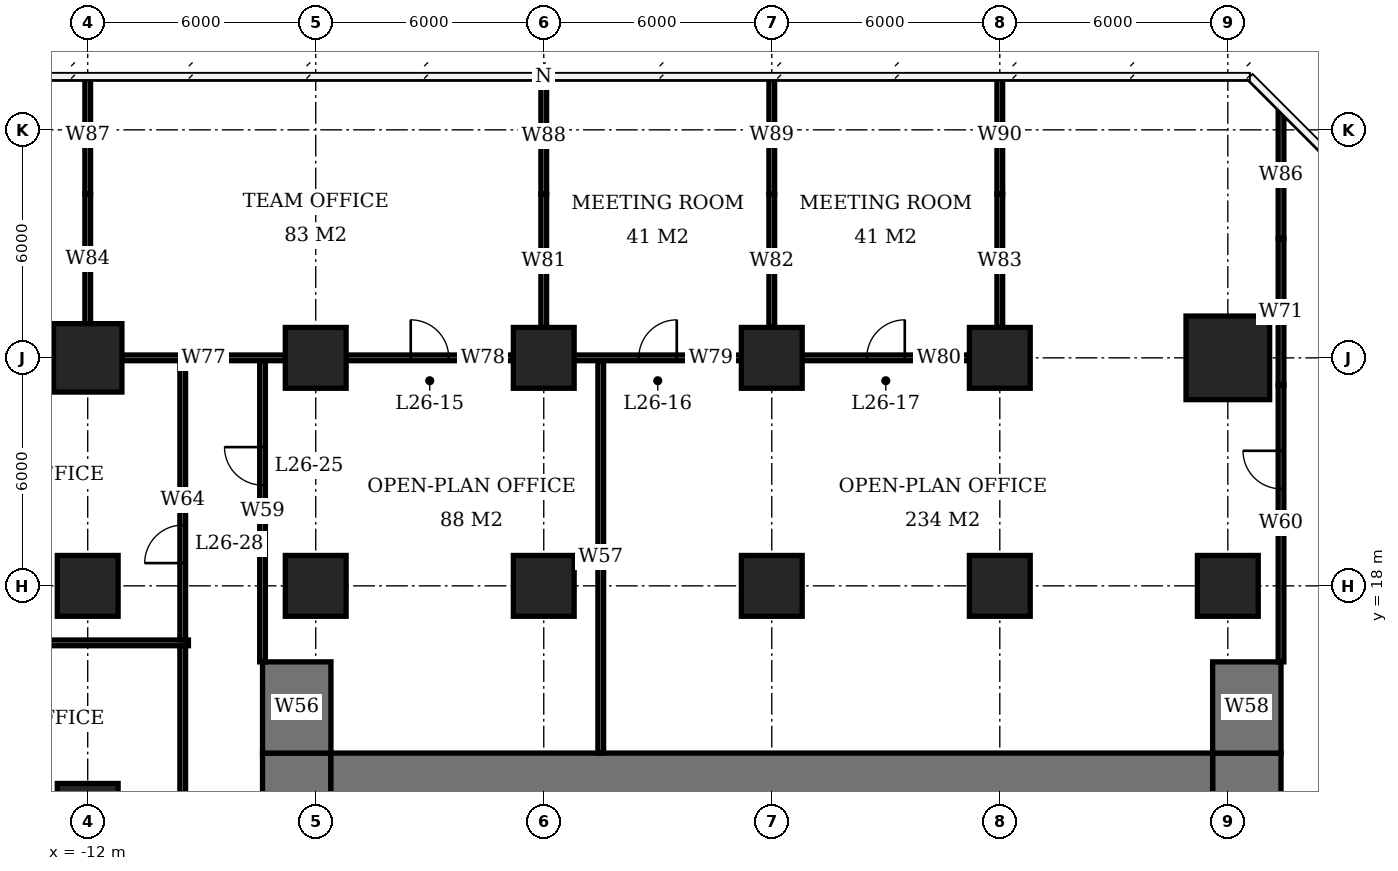
"""IFC4 building model, lengths in metres.
Left out: names, types, materials, properties, quantities, classifications, styles, units other than length and angle.
Written with IfcOpenShell. Run it as: python <this file> out.ifc"""

import sys

from ifc_helpers import new_model, si_unit, direction, frame, frame_2d, origin, origin_2d, place, context, subcontext, project, spatial, rectangle, extrude, element, fill, save


model = new_model("IFC4")
c1 = context("Model", 3, precision=1e-05, world=origin(), true_north=direction((0.0, 1.0)))
c2 = subcontext(c1, "Body", "Model", "MODEL_VIEW")
j1 = project(units=[si_unit("LENGTHUNIT", "METRE"), si_unit("PLANEANGLEUNIT", "RADIAN")], contexts=[c1])
p1 = place(None, origin())
s1 = spatial("IfcSite", under=j1, at=p1, CompositionType="ELEMENT")
p2 = place(p1, origin())
s2 = spatial("IfcBuilding", under=s1, at=p2, CompositionType="ELEMENT")
p3 = place(p2, frame((0.0, 0.0, 109.4)))
s3 = spatial("IfcBuildingStorey", under=s2, at=p3, CompositionType="ELEMENT", Elevation=109.4)
for number, where, z_axis, x_axis in (
    (1, (-12.0, 12.0, 0.0), (0.0, 0.0, 1.0), (1.0, 0.0, 0.0)),
    (2, (-12.0, 18.0, 0.0), (0.0, 0.0, 1.0), (1.0, 0.0, 0.0)),
):
    element("IfcColumn", number, at=place(p3, frame(where, z_axis=z_axis, x_axis=x_axis)), inside=s3, PredefinedType="COLUMN", context=c2, shape_type="SweptSolid", body=[
        extrude(rectangle(XDim=1.6, YDim=1.6, at=origin_2d()), origin(), (0.0, 0.0, 1.0), 3.9),
    ])
p4 = place(p3, frame((-12.0, 24.0, 0.0), z_axis=(0.0, 0.0, 1.0), x_axis=(1.0, 0.0, 0.0)))
e3 = element("IfcColumn", 3, at=p4, inside=s3, PredefinedType="COLUMN", context=c2, shape_type="SweptSolid", body=[
    extrude(rectangle(XDim=1.8, YDim=1.8, at=origin_2d()), origin(), (0.0, 0.0, 1.0), 3.9),
])
for number, where, z_axis, x_axis in (
    (4, (-6.0, 18.0, 0.0), (0.0, 0.0, 1.0), (1.0, 0.0, 0.0)),
    (5, (-6.0, 24.0, 0.0), (0.0, 0.0, 1.0), (1.0, 0.0, 0.0)),
    (6, (0.0, 18.0, 0.0), (0.0, 0.0, 1.0), (1.0, 0.0, 0.0)),
    (7, (0.0, 24.0, 0.0), (0.0, 0.0, 1.0), (1.0, 0.0, 0.0)),
    (8, (6.0, 18.0, 0.0), (0.0, 0.0, 1.0), (1.0, 0.0, 0.0)),
    (9, (6.0, 24.0, 0.0), (0.0, 0.0, 1.0), (1.0, 0.0, 0.0)),
    (10, (12.0, 18.0, 0.0), (0.0, 0.0, 1.0), (1.0, 0.0, 0.0)),
    (11, (12.0, 24.0, 0.0), (0.0, 0.0, 1.0), (1.0, 0.0, 0.0)),
    (12, (18.0, 18.0, 0.0), (0.0, 0.0, 1.0), (1.0, 0.0, 0.0)),
):
    element("IfcColumn", number, at=place(p3, frame(where, z_axis=z_axis, x_axis=x_axis)), inside=s3, PredefinedType="COLUMN", context=c2, shape_type="SweptSolid", body=[
        extrude(rectangle(XDim=1.6, YDim=1.6, at=origin_2d()), origin(), (0.0, 0.0, 1.0), 3.9),
    ])
p5 = place(p3, frame((18.0, 24.0, 0.0), z_axis=(0.0, 0.0, 1.0), x_axis=(1.0, 0.0, 0.0)))
e13 = element("IfcColumn", 13, at=p5, inside=s3, PredefinedType="COLUMN", context=c2, shape_type="SweptSolid", body=[
    extrude(rectangle(XDim=2.2, YDim=2.2, at=origin_2d()), origin(), (0.0, 0.0, 1.0), 3.9),
])
p6 = place(p3, frame((-5.6, 12.6, 0.0), z_axis=(0.0, 0.0, 1.0), x_axis=(1.0, 0.0, 0.0)))
e14 = element("IfcWall", 14, at=p6, inside=s3, PredefinedType="SHEAR", context=c2, shape_type="SweptSolid", body=[
    extrude(rectangle(XDim=23.2, YDim=2.0, at=frame_2d((11.6, 0.0))), origin(), (0.0, 0.0, 1.0), 3.9),
])
p7 = place(p3, frame((-6.5, -7.6, 0.0), z_axis=(0.0, 0.0, 1.0), x_axis=(0.0, 1.0, 0.0)))
e15 = element("IfcWall", 15, at=p7, inside=s3, PredefinedType="SHEAR", context=c2, shape_type="SweptSolid", body=[
    extrude(rectangle(XDim=21.2, YDim=1.8, at=frame_2d((10.6, 0.0))), origin(), (0.0, 0.0, 1.0), 3.9),
])
p8 = place(p7, frame((7.8, 0.0, 0.0)))
e16 = element("IfcOpeningElement", 16, at=p8, cuts=e15, PredefinedType="OPENING", context=c2, shape_type="SweptSolid", body=[
    extrude(rectangle(XDim=1.8, YDim=2.4, at=frame_2d((0.9, 1.2))), frame((0.0, 0.91, 0.0), z_axis=(0.0, -1.0, 0.0), x_axis=(1.0, 0.0, 0.0)), (0.0, 0.0, 1.0), 1.82),
])
p9 = place(p3, frame((18.5, -7.6, 0.0), z_axis=(0.0, 0.0, 1.0), x_axis=(0.0, 1.0, 0.0)))
e17 = element("IfcWall", 17, at=p9, inside=s3, PredefinedType="SHEAR", context=c2, shape_type="SweptSolid", body=[
    extrude(rectangle(XDim=21.2, YDim=1.8, at=frame_2d((10.6, 0.0))), origin(), (0.0, 0.0, 1.0), 3.9),
])
p10 = place(p9, frame((9.2, 0.0, 0.0)))
e18 = element("IfcOpeningElement", 18, at=p10, cuts=e17, PredefinedType="OPENING", context=c2, shape_type="SweptSolid", body=[
    extrude(rectangle(XDim=1.8, YDim=2.4, at=frame_2d((0.9, 1.2))), frame((0.0, 0.91, 0.0), z_axis=(0.0, -1.0, 0.0), x_axis=(1.0, 0.0, 0.0)), (0.0, 0.0, 1.0), 1.82),
])
for number, where, z_axis, x_axis in (
    (19, (-6.5, 13.6, 0.0), (0.0, 0.0, 1.0), (0.0, 1.0, 0.0)),
    (20, (18.5, 13.6, 0.0), (0.0, 0.0, 1.0), (0.0, 1.0, 0.0)),
):
    element("IfcWall", number, at=place(p3, frame(where, z_axis=z_axis, x_axis=x_axis)), inside=s3, PredefinedType="SHEAR", context=c2, shape_type="SweptSolid", body=[
        extrude(rectangle(XDim=2.4, YDim=1.8, at=frame_2d((1.2, 0.0))), origin(), (0.0, 0.0, 1.0), 3.9),
    ])
p11 = place(p3, frame((-11.1, 24.0, 0.0), z_axis=(0.0, 0.0, 1.0), x_axis=(1.0, 0.0, 0.0)))
e21 = element("IfcWall", 21, at=p11, inside=s3, PredefinedType="PARTITIONING", context=c2, shape_type="SweptSolid", body=[
    extrude(rectangle(XDim=4.3, YDim=0.15, at=frame_2d((2.15, 0.0))), origin(), (0.0, 0.0, 1.0), 3.65),
])
p12 = place(p3, frame((-5.2, 24.0, 0.0), z_axis=(0.0, 0.0, 1.0), x_axis=(1.0, 0.0, 0.0)))
e22 = element("IfcWall", 22, at=p12, inside=s3, PredefinedType="PARTITIONING", context=c2, shape_type="SweptSolid", body=[
    extrude(rectangle(XDim=4.4, YDim=0.15, at=frame_2d((2.2, 0.0))), origin(), (0.0, 0.0, 1.0), 3.65),
])
p13 = place(p12, frame((1.7, 0.0, 0.0)))
e23 = element("IfcOpeningElement", 23, at=p13, cuts=e22, PredefinedType="OPENING", context=c2, shape_type="SweptSolid", body=[
    extrude(rectangle(XDim=1.0, YDim=2.1, at=frame_2d((0.5, 1.05))), frame((0.0, 0.085, 0.0), z_axis=(0.0, -1.0, 0.0), x_axis=(1.0, 0.0, 0.0)), (0.0, 0.0, 1.0), 0.17),
])
p14 = place(p3, frame((0.8, 24.0, 0.0), z_axis=(0.0, 0.0, 1.0), x_axis=(1.0, 0.0, 0.0)))
e24 = element("IfcWall", 24, at=p14, inside=s3, PredefinedType="PARTITIONING", context=c2, shape_type="SweptSolid", body=[
    extrude(rectangle(XDim=4.4, YDim=0.15, at=frame_2d((2.2, 0.0))), origin(), (0.0, 0.0, 1.0), 3.65),
])
p15 = place(p14, frame((1.7, 0.0, 0.0)))
e25 = element("IfcOpeningElement", 25, at=p15, cuts=e24, PredefinedType="OPENING", context=c2, shape_type="SweptSolid", body=[
    extrude(rectangle(XDim=1.0, YDim=2.1, at=frame_2d((0.5, 1.05))), frame((0.0, 0.085, 0.0), z_axis=(0.0, -1.0, 0.0), x_axis=(1.0, 0.0, 0.0)), (0.0, 0.0, 1.0), 0.17),
])
p16 = place(p3, frame((6.8, 24.0, 0.0), z_axis=(0.0, 0.0, 1.0), x_axis=(1.0, 0.0, 0.0)))
e26 = element("IfcWall", 26, at=p16, inside=s3, PredefinedType="PARTITIONING", context=c2, shape_type="SweptSolid", body=[
    extrude(rectangle(XDim=4.4, YDim=0.15, at=frame_2d((2.2, 0.0))), origin(), (0.0, 0.0, 1.0), 3.65),
])
p17 = place(p16, frame((1.7, 0.0, 0.0)))
e27 = element("IfcOpeningElement", 27, at=p17, cuts=e26, PredefinedType="OPENING", context=c2, shape_type="SweptSolid", body=[
    extrude(rectangle(XDim=1.0, YDim=2.1, at=frame_2d((0.5, 1.05))), frame((0.0, 0.085, 0.0), z_axis=(0.0, -1.0, 0.0), x_axis=(1.0, 0.0, 0.0)), (0.0, 0.0, 1.0), 0.17),
])
p18 = place(p3, frame((-12.0, 24.9, 0.0), z_axis=(0.0, 0.0, 1.0), x_axis=(0.0, 1.0, 0.0)))
e28 = element("IfcWall", 28, at=p18, inside=s3, PredefinedType="PARTITIONING", context=c2, shape_type="SweptSolid", body=[
    extrude(rectangle(XDim=3.41, YDim=0.15, at=frame_2d((1.705, 0.0))), origin(), (0.0, 0.0, 1.0), 2.65),
])
p19 = place(p3, frame((-12.0, 28.31, 0.0), z_axis=(0.0, 0.0, 1.0), x_axis=(0.0, 1.0, 0.0)))
e29 = element("IfcWall", 29, at=p19, inside=s3, PredefinedType="PARTITIONING", context=c2, shape_type="SweptSolid", body=[
    extrude(rectangle(XDim=3.09, YDim=0.15, at=frame_2d((1.545, 0.0))), origin(), (0.0, 0.0, 1.0), 3.65),
])
p20 = place(p3, frame((0.0, 24.8, 0.0), z_axis=(0.0, 0.0, 1.0), x_axis=(0.0, 1.0, 0.0)))
e30 = element("IfcWall", 30, at=p20, inside=s3, PredefinedType="PARTITIONING", context=c2, shape_type="SweptSolid", body=[
    extrude(rectangle(XDim=3.51, YDim=0.15, at=frame_2d((1.755, 0.0))), origin(), (0.0, 0.0, 1.0), 2.65),
])
p21 = place(p3, frame((0.0, 28.31, 0.0), z_axis=(0.0, 0.0, 1.0), x_axis=(0.0, 1.0, 0.0)))
e31 = element("IfcWall", 31, at=p21, inside=s3, PredefinedType="PARTITIONING", context=c2, shape_type="SweptSolid", body=[
    extrude(rectangle(XDim=3.04, YDim=0.15, at=frame_2d((1.52, 0.0))), origin(), (0.0, 0.0, 1.0), 3.65),
])
p22 = place(p3, frame((6.0, 24.8, 0.0), z_axis=(0.0, 0.0, 1.0), x_axis=(0.0, 1.0, 0.0)))
e32 = element("IfcWall", 32, at=p22, inside=s3, PredefinedType="PARTITIONING", context=c2, shape_type="SweptSolid", body=[
    extrude(rectangle(XDim=3.51, YDim=0.15, at=frame_2d((1.755, 0.0))), origin(), (0.0, 0.0, 1.0), 2.65),
])
p23 = place(p3, frame((6.0, 28.31, 0.0), z_axis=(0.0, 0.0, 1.0), x_axis=(0.0, 1.0, 0.0)))
e33 = element("IfcWall", 33, at=p23, inside=s3, PredefinedType="PARTITIONING", context=c2, shape_type="SweptSolid", body=[
    extrude(rectangle(XDim=3.09, YDim=0.15, at=frame_2d((1.545, 0.0))), origin(), (0.0, 0.0, 1.0), 3.65),
])
p24 = place(p3, frame((12.0, 24.8, 0.0), z_axis=(0.0, 0.0, 1.0), x_axis=(0.0, 1.0, 0.0)))
e34 = element("IfcWall", 34, at=p24, inside=s3, PredefinedType="PARTITIONING", context=c2, shape_type="SweptSolid", body=[
    extrude(rectangle(XDim=3.51, YDim=0.15, at=frame_2d((1.755, 0.0))), origin(), (0.0, 0.0, 1.0), 2.65),
])
p25 = place(p3, frame((12.0, 28.31, 0.0), z_axis=(0.0, 0.0, 1.0), x_axis=(0.0, 1.0, 0.0)))
e35 = element("IfcWall", 35, at=p25, inside=s3, PredefinedType="PARTITIONING", context=c2, shape_type="SweptSolid", body=[
    extrude(rectangle(XDim=3.09, YDim=0.15, at=frame_2d((1.545, 0.0))), origin(), (0.0, 0.0, 1.0), 3.65),
])
p26 = place(p3, frame((-21.59, 16.5, 0.0), z_axis=(0.0, 0.0, 1.0), x_axis=(1.0, 0.0, 0.0)))
e36 = element("IfcWall", 36, at=p26, inside=s3, PredefinedType="PARTITIONING", context=c2, shape_type="SweptSolid", body=[
    extrude(rectangle(XDim=12.24, YDim=0.15, at=frame_2d((6.12, 0.0))), origin(), (0.0, 0.0, 1.0), 3.65),
])
p27 = place(p3, frame((-9.5, 4.575, 0.0), z_axis=(0.0, 0.0, 1.0), x_axis=(0.0, 1.0, 0.0)))
e37 = element("IfcWall", 37, at=p27, inside=s3, PredefinedType="PARTITIONING", context=c2, shape_type="SweptSolid", body=[
    extrude(rectangle(XDim=11.85, YDim=0.15, at=frame_2d((5.925, 0.0))), origin(), (0.0, 0.0, 1.0), 3.65),
])
p28 = place(p27, frame((3.625, 0.0, 0.0)))
e38 = element("IfcOpeningElement", 38, at=p28, cuts=e37, PredefinedType="OPENING", context=c2, shape_type="SweptSolid", body=[
    extrude(rectangle(XDim=1.0, YDim=2.1, at=frame_2d((0.5, 1.05))), frame((0.0, 0.085, 0.0), z_axis=(0.0, -1.0, 0.0), x_axis=(1.0, 0.0, 0.0)), (0.0, 0.0, 1.0), 0.17),
])
p29 = place(p3, frame((-9.5, 16.575, 0.0), z_axis=(0.0, 0.0, 1.0), x_axis=(0.0, 1.0, 0.0)))
e39 = element("IfcWall", 39, at=p29, inside=s3, PredefinedType="PARTITIONING", context=c2, shape_type="SweptSolid", body=[
    extrude(rectangle(XDim=7.35, YDim=0.15, at=frame_2d((3.675, 0.0))), origin(), (0.0, 0.0, 1.0), 3.65),
])
p30 = place(p29, frame((2.024, 0.0, 0.0)))
e40 = element("IfcOpeningElement", 40, at=p30, cuts=e39, PredefinedType="OPENING", context=c2, shape_type="SweptSolid", body=[
    extrude(rectangle(XDim=1.0, YDim=2.1, at=frame_2d((0.5, 1.05))), frame((0.0, 0.085, 0.0), z_axis=(0.0, -1.0, 0.0), x_axis=(1.0, 0.0, 0.0)), (0.0, 0.0, 1.0), 0.17),
])
p31 = place(p3, frame((-7.4, 16.0, 0.0), z_axis=(0.0, 0.0, 1.0), x_axis=(0.0, 1.0, 0.0)))
e41 = element("IfcWall", 41, at=p31, inside=s3, PredefinedType="PARTITIONING", context=c2, shape_type="SweptSolid", body=[
    extrude(rectangle(XDim=7.925, YDim=0.15, at=frame_2d((3.962, 0.0))), origin(), (0.0, 0.0, 1.0), 3.65),
])
p32 = place(p31, frame((4.651, 0.0, 0.0)))
e42 = element("IfcOpeningElement", 42, at=p32, cuts=e41, PredefinedType="OPENING", context=c2, shape_type="SweptSolid", body=[
    extrude(rectangle(XDim=1.0, YDim=2.1, at=frame_2d((0.5, 1.05))), frame((0.0, 0.085, 0.0), z_axis=(0.0, -1.0, 0.0), x_axis=(1.0, 0.0, 0.0)), (0.0, 0.0, 1.0), 0.17),
])
p33 = place(p3, frame((1.5, 13.6, 0.0), z_axis=(0.0, 0.0, 1.0), x_axis=(0.0, 1.0, 0.0)))
e43 = element("IfcWall", 43, at=p33, inside=s3, PredefinedType="PARTITIONING", context=c2, shape_type="SweptSolid", body=[
    extrude(rectangle(XDim=10.325, YDim=0.15, at=frame_2d((5.163, 0.0))), origin(), (0.0, 0.0, 1.0), 3.65),
])
p34 = place(p3, frame((19.4, 16.0, 0.0), z_axis=(0.0, 0.0, 1.0), x_axis=(0.0, 1.0, 0.0)))
e44 = element("IfcWall", 44, at=p34, inside=s3, PredefinedType="PARTITIONING", context=c2, shape_type="SweptSolid", body=[
    extrude(rectangle(XDim=7.29, YDim=0.15, at=frame_2d((3.645, 0.0))), origin(), (0.0, 0.0, 1.0), 3.65),
])
p35 = place(p34, frame((4.554, 0.0, 0.0)))
e45 = element("IfcOpeningElement", 45, at=p35, cuts=e44, PredefinedType="OPENING", context=c2, shape_type="SweptSolid", body=[
    extrude(rectangle(XDim=1.0, YDim=2.1, at=frame_2d((0.5, 1.05))), frame((0.0, 0.085, 0.0), z_axis=(0.0, -1.0, 0.0), x_axis=(1.0, 0.0, 0.0)), (0.0, 0.0, 1.0), 0.17),
])
p36 = place(p3, frame((19.4, 23.29, 0.0), z_axis=(0.0, 0.0, 1.0), x_axis=(0.0, 1.0, 0.0)))
e46 = element("IfcWall", 46, at=p36, inside=s3, PredefinedType="PARTITIONING", context=c2, shape_type="SweptSolid", body=[
    extrude(rectangle(XDim=3.85, YDim=0.15, at=frame_2d((1.925, 0.0))), origin(), (0.0, 0.0, 1.0), 2.65),
])
p37 = place(p3, frame((19.4, 27.14, 0.0), z_axis=(0.0, 0.0, 1.0), x_axis=(0.0, 1.0, 0.0)))
e47 = element("IfcWall", 47, at=p37, inside=s3, PredefinedType="PARTITIONING", context=c2, shape_type="SweptSolid", body=[
    extrude(rectangle(XDim=3.349, YDim=0.15, at=frame_2d((1.675, 0.0))), origin(), (0.0, 0.0, 1.0), 3.65),
])
p38 = place(p13, origin())
e48 = element("IfcDoor", 48, at=p38, inside=s3, OperationType="SINGLE_SWING_LEFT", PredefinedType="DOOR", context=c2, shape_type="SweptSolid", body=[
    extrude(rectangle(XDim=1.0, YDim=2.1, at=frame_2d((0.5, 1.05))), frame((0.0, 0.025, 0.0), z_axis=(0.0, -1.0, 0.0), x_axis=(1.0, 0.0, 0.0)), (0.0, 0.0, 1.0), 0.05),
])
fill(e23, e48)
p39 = place(p15, origin())
e49 = element("IfcDoor", 49, at=p39, inside=s3, OperationType="SINGLE_SWING_RIGHT", PredefinedType="DOOR", context=c2, shape_type="SweptSolid", body=[
    extrude(rectangle(XDim=1.0, YDim=2.1, at=frame_2d((0.5, 1.05))), frame((0.0, 0.025, 0.0), z_axis=(0.0, -1.0, 0.0), x_axis=(1.0, 0.0, 0.0)), (0.0, 0.0, 1.0), 0.05),
])
fill(e25, e49)
p40 = place(p17, origin())
e50 = element("IfcDoor", 50, at=p40, inside=s3, OperationType="SINGLE_SWING_RIGHT", PredefinedType="DOOR", context=c2, shape_type="SweptSolid", body=[
    extrude(rectangle(XDim=1.0, YDim=2.1, at=frame_2d((0.5, 1.05))), frame((0.0, 0.025, 0.0), z_axis=(0.0, -1.0, 0.0), x_axis=(1.0, 0.0, 0.0)), (0.0, 0.0, 1.0), 0.05),
])
fill(e27, e50)
p41 = place(p32, origin())
e51 = element("IfcDoor", 51, at=p41, inside=s3, OperationType="SINGLE_SWING_RIGHT", PredefinedType="DOOR", context=c2, shape_type="SweptSolid", body=[
    extrude(rectangle(XDim=1.0, YDim=2.1, at=frame_2d((0.5, 1.05))), frame((0.0, 0.025, 0.0), z_axis=(0.0, -1.0, 0.0), x_axis=(1.0, 0.0, 0.0)), (0.0, 0.0, 1.0), 0.05),
])
fill(e42, e51)
p42 = place(p35, origin())
e52 = element("IfcDoor", 52, at=p42, inside=s3, OperationType="SINGLE_SWING_RIGHT", PredefinedType="DOOR", context=c2, shape_type="SweptSolid", body=[
    extrude(rectangle(XDim=1.0, YDim=2.1, at=frame_2d((0.5, 1.05))), frame((0.0, 0.025, 0.0), z_axis=(0.0, -1.0, 0.0), x_axis=(1.0, 0.0, 0.0)), (0.0, 0.0, 1.0), 0.05),
])
fill(e45, e52)
p43 = place(p30, origin())
e53 = element("IfcDoor", 53, at=p43, inside=s3, OperationType="SINGLE_SWING_LEFT", PredefinedType="DOOR", context=c2, shape_type="SweptSolid", body=[
    extrude(rectangle(XDim=1.0, YDim=2.1, at=frame_2d((0.5, 1.05))), frame((0.0, 0.025, 0.0), z_axis=(0.0, -1.0, 0.0), x_axis=(1.0, 0.0, 0.0)), (0.0, 0.0, 1.0), 0.05),
])
fill(e40, e53)
save(model, sys.argv[1])
